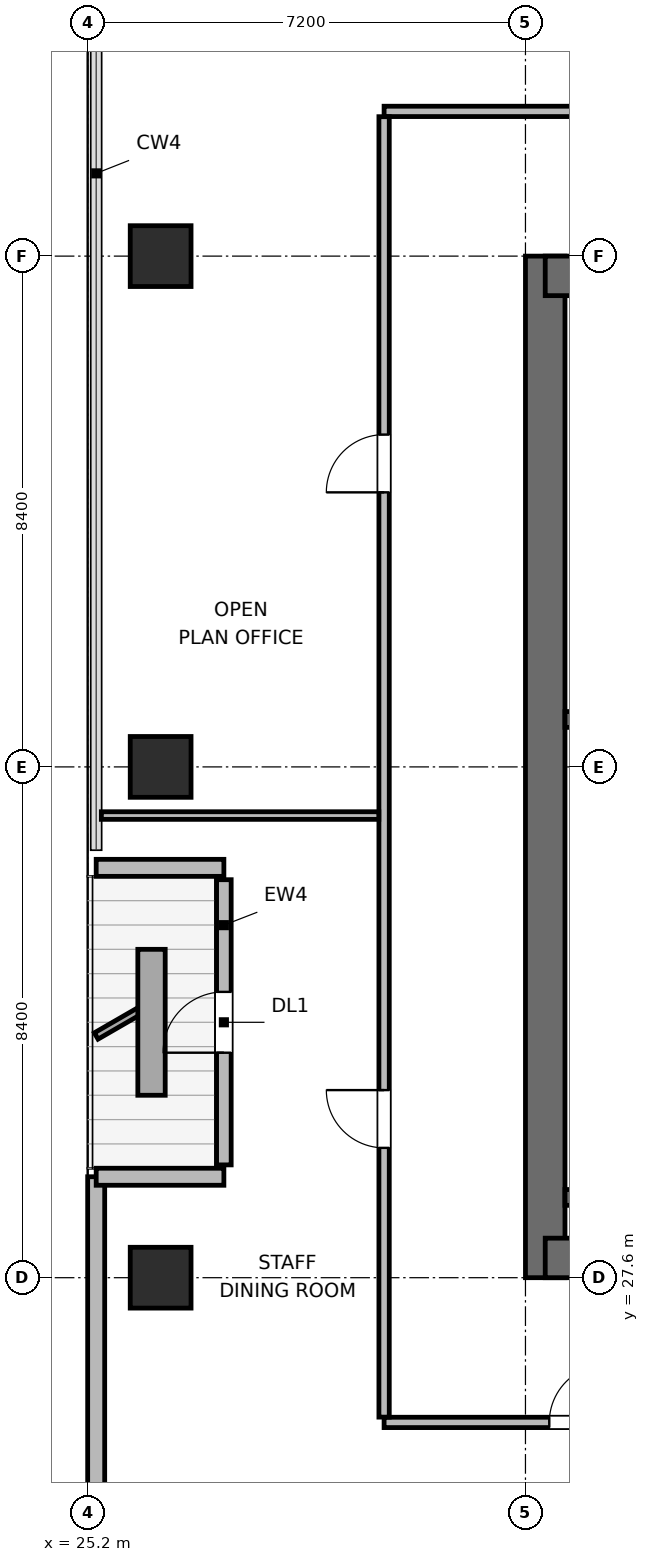
"""IFC4 building model, lengths in metres.
Left out: names, types, materials, properties, quantities, classifications, styles, units other than length and angle.
Written with IfcOpenShell. Run it as: python <this file> out.ifc"""

import sys

from ifc_helpers import new_model, si_unit, direction, frame, frame_2d, origin, origin_2d, place, context, subcontext, project, spatial, rectangle, extrude, element, fill, save


model = new_model("IFC4")
c1 = context("Model", 3, precision=1e-05, world=origin(), true_north=direction((0.0, 1.0)))
c2 = subcontext(c1, "Body", "Model", "MODEL_VIEW")
j1 = project(units=[si_unit("LENGTHUNIT", "METRE"), si_unit("PLANEANGLEUNIT", "RADIAN")], contexts=[c1])
p1 = place(None, origin())
s1 = spatial("IfcSite", under=j1, at=p1, CompositionType="ELEMENT")
p2 = place(p1, origin())
s2 = spatial("IfcBuilding", under=s1, at=p2, CompositionType="ELEMENT")
p3 = place(p2, frame((0.0, 0.0, 247.2)))
s3 = spatial("IfcBuildingStorey", under=s2, at=p3, CompositionType="ELEMENT", Elevation=247.2)
p4 = place(p3, frame((32.725, 27.6, 0.0), z_axis=(0.0, 0.0, 1.0), x_axis=(0.0, 1.0, 0.0)))
e1 = element("IfcWall", 1, at=p4, inside=s3, PredefinedType="SHEAR", context=c2, shape_type="SweptSolid", body=[
    extrude(rectangle(XDim=16.8, YDim=0.65, at=frame_2d((8.4, 0.0))), origin(), (0.0, 0.0, 1.0), 3.9),
])
p5 = place(p3, frame((32.725, 27.925, 0.0), z_axis=(0.0, 0.0, 1.0), x_axis=(1.0, 0.0, 0.0)))
e2 = element("IfcWall", 2, at=p5, inside=s3, PredefinedType="SHEAR", context=c2, shape_type="SweptSolid", body=[
    extrude(rectangle(XDim=9.35, YDim=0.65, at=frame_2d((4.675, 0.0))), origin(), (0.0, 0.0, 1.0), 3.9),
])
p6 = place(p5, frame((5.025, 0.0, 0.0)))
e3 = element("IfcOpeningElement", 3, at=p6, cuts=e2, PredefinedType="OPENING", context=c2, shape_type="SweptSolid", body=[
    extrude(rectangle(XDim=1.05, YDim=2.04, at=frame_2d((0.525, 1.02))), frame((0.0, 0.335, 0.0), z_axis=(0.0, -1.0, 0.0), x_axis=(1.0, 0.0, 0.0)), (0.0, 0.0, 1.0), 0.67),
])
p7 = place(p3, frame((32.725, 44.075, 0.0), z_axis=(0.0, 0.0, 1.0), x_axis=(1.0, 0.0, 0.0)))
e4 = element("IfcWall", 4, at=p7, inside=s3, PredefinedType="SHEAR", context=c2, shape_type="SweptSolid", body=[
    extrude(rectangle(XDim=9.35, YDim=0.65, at=frame_2d((4.675, 0.0))), origin(), (0.0, 0.0, 1.0), 3.9),
])
p8 = place(p7, frame((1.025, 0.0, 0.0)))
e5 = element("IfcOpeningElement", 5, at=p8, cuts=e4, PredefinedType="OPENING", context=c2, shape_type="SweptSolid", body=[
    extrude(rectangle(XDim=0.95, YDim=2.04, at=frame_2d((0.475, 1.02))), frame((0.0, 0.335, 0.0), z_axis=(0.0, -1.0, 0.0), x_axis=(1.0, 0.0, 0.0)), (0.0, 0.0, 1.0), 0.67),
])
p9 = place(p7, frame((4.275, 0.0, 0.0)))
e6 = element("IfcOpeningElement", 6, at=p9, cuts=e4, PredefinedType="OPENING", context=c2, shape_type="SweptSolid", body=[
    extrude(rectangle(XDim=0.9, YDim=2.02, at=frame_2d((0.45, 1.01))), frame((0.0, 0.335, 0.0), z_axis=(0.0, -1.0, 0.0), x_axis=(1.0, 0.0, 0.0)), (0.0, 0.0, 1.0), 0.67),
])
p10 = place(p7, frame((7.175, 0.0, 0.0)))
e7 = element("IfcOpeningElement", 7, at=p10, cuts=e4, PredefinedType="OPENING", context=c2, shape_type="SweptSolid", body=[
    extrude(rectangle(XDim=0.9, YDim=2.02, at=frame_2d((0.45, 1.01))), frame((0.0, 0.335, 0.0), z_axis=(0.0, -1.0, 0.0), x_axis=(1.0, 0.0, 0.0)), (0.0, 0.0, 1.0), 0.67),
])
for number, where, z_axis, x_axis in (
    (8, (33.05, 28.92, 0.0), (0.0, 0.0, 1.0), (1.0, 0.0, 0.0)),
    (9, (33.05, 36.78, 0.0), (0.0, 0.0, 1.0), (1.0, 0.0, 0.0)),
):
    element("IfcWall", number, at=place(p3, frame(where, z_axis=z_axis, x_axis=x_axis)), inside=s3, PredefinedType="SHEAR", context=c2, shape_type="SweptSolid", body=[
        extrude(rectangle(XDim=4.06, YDim=0.26, at=frame_2d((2.03, 0.0))), origin(), (0.0, 0.0, 1.0), 3.9),
    ])
for number, where, z_axis, x_axis in (
    (10, (26.4, 27.6, 0.0), (0.0, 0.0, 1.0), (1.0, 0.0, 0.0)),
    (11, (26.4, 36.0, 0.0), (0.0, 0.0, 1.0), (1.0, 0.0, 0.0)),
    (12, (26.4, 44.4, 0.0), (0.0, 0.0, 1.0), (1.0, 0.0, 0.0)),
):
    element("IfcColumn", number, at=place(p3, frame(where, z_axis=z_axis, x_axis=x_axis)), inside=s3, PredefinedType="COLUMN", context=c2, shape_type="SweptSolid", body=[
        extrude(rectangle(XDim=1.0, YDim=1.0, at=origin_2d()), origin(), (0.0, 0.0, 1.0), 3.9),
    ])
p11 = place(p3, frame((25.34, 23.818, 0.0), z_axis=(0.0, 0.0, 1.0), x_axis=(0.0, 1.0, 0.0)))
e13 = element("IfcWall", 13, at=p11, inside=s3, PredefinedType="SOLIDWALL", context=c2, shape_type="SweptSolid", body=[
    extrude(rectangle(XDim=5.442, YDim=0.28, at=frame_2d((2.721, 0.0))), origin(), (0.0, 0.0, 1.0), 3.68),
])
p12 = place(p3, frame((25.34, 29.26, 0.0), z_axis=(0.0, 0.0, 1.0), x_axis=(1.0, 0.0, 0.0)))
e14 = element("IfcWall", 14, at=p12, inside=s3, PredefinedType="SOLIDWALL", context=c2, shape_type="SweptSolid", body=[
    extrude(rectangle(XDim=2.1, YDim=0.28, at=frame_2d((1.05, 0.0))), origin(), (0.0, 0.0, 1.0), 3.116),
])
p13 = place(p3, frame((27.44, 29.455, 0.0), z_axis=(0.0, 0.0, 1.0), x_axis=(0.0, 1.0, 0.0)))
e15 = element("IfcWall", 15, at=p13, inside=s3, PredefinedType="SOLIDWALL", context=c2, shape_type="SweptSolid", body=[
    extrude(rectangle(XDim=4.69, YDim=0.24, at=frame_2d((2.345, 0.0))), origin(), (0.0, 0.0, 1.0), 3.248),
])
p14 = place(p13, frame((1.845, 0.0, 0.0)))
e16 = element("IfcOpeningElement", 16, at=p14, cuts=e15, PredefinedType="OPENING", context=c2, shape_type="SweptSolid", body=[
    extrude(rectangle(XDim=1.0, YDim=2.02, at=frame_2d((0.5, 1.01))), frame((0.0, 0.13, 0.0), z_axis=(0.0, -1.0, 0.0), x_axis=(1.0, 0.0, 0.0)), (0.0, 0.0, 1.0), 0.26),
])
p15 = place(p3, frame((27.44, 34.34, 0.0), z_axis=(0.0, 0.0, 1.0), x_axis=(-1.0, 0.0, 0.0)))
e17 = element("IfcWall", 17, at=p15, inside=s3, PredefinedType="SOLIDWALL", context=c2, shape_type="SweptSolid", body=[
    extrude(rectangle(XDim=2.1, YDim=0.28, at=frame_2d((1.05, 0.0))), origin(), (0.0, 0.0, 1.0), 3.116),
])
p16 = place(p3, frame((30.075, 25.22, 0.0), z_axis=(0.0, 0.0, 1.0), x_axis=(1.0, 0.0, 0.0)))
e18 = element("IfcWall", 18, at=p16, inside=s3, PredefinedType="PARTITIONING", context=c2, shape_type="SweptSolid", body=[
    extrude(rectangle(XDim=33.525, YDim=0.17, at=frame_2d((16.763, 0.0))), origin(), (0.0, 0.0, 1.0), 3.68),
])
p17 = place(p16, frame((2.717, 0.0, 0.0)))
e19 = element("IfcOpeningElement", 19, at=p17, cuts=e18, PredefinedType="OPENING", context=c2, shape_type="SweptSolid", body=[
    extrude(rectangle(XDim=0.95, YDim=2.04, at=frame_2d((0.475, 1.02))), frame((0.0, 0.095, 0.0), z_axis=(0.0, -1.0, 0.0), x_axis=(1.0, 0.0, 0.0)), (0.0, 0.0, 1.0), 0.19),
])
p18 = place(p16, frame((8.505, 0.0, 0.0)))
e20 = element("IfcOpeningElement", 20, at=p18, cuts=e18, PredefinedType="OPENING", context=c2, shape_type="SweptSolid", body=[
    extrude(rectangle(XDim=0.95, YDim=2.04, at=frame_2d((0.475, 1.02))), frame((0.0, 0.095, 0.0), z_axis=(0.0, -1.0, 0.0), x_axis=(1.0, 0.0, 0.0)), (0.0, 0.0, 1.0), 0.19),
])
p19 = place(p16, frame((13.695, 0.0, 0.0)))
e21 = element("IfcOpeningElement", 21, at=p19, cuts=e18, PredefinedType="OPENING", context=c2, shape_type="SweptSolid", body=[
    extrude(rectangle(XDim=0.95, YDim=2.04, at=frame_2d((0.475, 1.02))), frame((0.0, 0.095, 0.0), z_axis=(0.0, -1.0, 0.0), x_axis=(1.0, 0.0, 0.0)), (0.0, 0.0, 1.0), 0.19),
])
p20 = place(p16, frame((18.88, 0.0, 0.0)))
e22 = element("IfcOpeningElement", 22, at=p20, cuts=e18, PredefinedType="OPENING", context=c2, shape_type="SweptSolid", body=[
    extrude(rectangle(XDim=0.95, YDim=2.04, at=frame_2d((0.475, 1.02))), frame((0.0, 0.095, 0.0), z_axis=(0.0, -1.0, 0.0), x_axis=(1.0, 0.0, 0.0)), (0.0, 0.0, 1.0), 0.19),
])
p21 = place(p16, frame((24.065, 0.0, 0.0)))
e23 = element("IfcOpeningElement", 23, at=p21, cuts=e18, PredefinedType="OPENING", context=c2, shape_type="SweptSolid", body=[
    extrude(rectangle(XDim=0.95, YDim=2.04, at=frame_2d((0.475, 1.02))), frame((0.0, 0.095, 0.0), z_axis=(0.0, -1.0, 0.0), x_axis=(1.0, 0.0, 0.0)), (0.0, 0.0, 1.0), 0.19),
])
p22 = place(p16, frame((29.855, 0.0, 0.0)))
e24 = element("IfcOpeningElement", 24, at=p22, cuts=e18, PredefinedType="OPENING", context=c2, shape_type="SweptSolid", body=[
    extrude(rectangle(XDim=0.95, YDim=2.04, at=frame_2d((0.475, 1.02))), frame((0.0, 0.095, 0.0), z_axis=(0.0, -1.0, 0.0), x_axis=(1.0, 0.0, 0.0)), (0.0, 0.0, 1.0), 0.19),
])
p23 = place(p3, frame((30.075, 46.78, 0.0), z_axis=(0.0, 0.0, 1.0), x_axis=(1.0, 0.0, 0.0)))
e25 = element("IfcWall", 25, at=p23, inside=s3, PredefinedType="PARTITIONING", context=c2, shape_type="SweptSolid", body=[
    extrude(rectangle(XDim=33.525, YDim=0.17, at=frame_2d((16.763, 0.0))), origin(), (0.0, 0.0, 1.0), 3.68),
])
p24 = place(p23, frame((4.693, 0.0, 0.0)))
e26 = element("IfcOpeningElement", 26, at=p24, cuts=e25, PredefinedType="OPENING", context=c2, shape_type="SweptSolid", body=[
    extrude(rectangle(XDim=0.95, YDim=2.04, at=frame_2d((0.475, 1.02))), frame((0.0, 0.095, 0.0), z_axis=(0.0, -1.0, 0.0), x_axis=(1.0, 0.0, 0.0)), (0.0, 0.0, 1.0), 0.19),
])
p25 = place(p23, frame((11.725, 0.0, 0.0)))
e27 = element("IfcOpeningElement", 27, at=p25, cuts=e25, PredefinedType="OPENING", context=c2, shape_type="SweptSolid", body=[
    extrude(rectangle(XDim=0.95, YDim=2.04, at=frame_2d((0.475, 1.02))), frame((0.0, 0.095, 0.0), z_axis=(0.0, -1.0, 0.0), x_axis=(1.0, 0.0, 0.0)), (0.0, 0.0, 1.0), 0.19),
])
p26 = place(p23, frame((19.505, 0.0, 0.0)))
e28 = element("IfcOpeningElement", 28, at=p26, cuts=e25, PredefinedType="OPENING", context=c2, shape_type="SweptSolid", body=[
    extrude(rectangle(XDim=0.95, YDim=2.04, at=frame_2d((0.475, 1.02))), frame((0.0, 0.095, 0.0), z_axis=(0.0, -1.0, 0.0), x_axis=(1.0, 0.0, 0.0)), (0.0, 0.0, 1.0), 0.19),
])
p27 = place(p23, frame((29.235, 0.0, 0.0)))
e29 = element("IfcOpeningElement", 29, at=p27, cuts=e25, PredefinedType="OPENING", context=c2, shape_type="SweptSolid", body=[
    extrude(rectangle(XDim=0.95, YDim=2.04, at=frame_2d((0.475, 1.02))), frame((0.0, 0.095, 0.0), z_axis=(0.0, -1.0, 0.0), x_axis=(1.0, 0.0, 0.0)), (0.0, 0.0, 1.0), 0.19),
])
p28 = place(p3, frame((30.075, 25.307, 0.0), z_axis=(0.0, 0.0, 1.0), x_axis=(0.0, 1.0, 0.0)))
e30 = element("IfcWall", 30, at=p28, inside=s3, PredefinedType="PARTITIONING", context=c2, shape_type="SweptSolid", body=[
    extrude(rectangle(XDim=21.386, YDim=0.17, at=frame_2d((10.693, 0.0))), origin(), (0.0, 0.0, 1.0), 3.68),
])
p29 = place(p28, frame((4.428, 0.0, 0.0)))
e31 = element("IfcOpeningElement", 31, at=p29, cuts=e30, PredefinedType="OPENING", context=c2, shape_type="SweptSolid", body=[
    extrude(rectangle(XDim=0.95, YDim=2.04, at=frame_2d((0.475, 1.02))), frame((0.0, 0.095, 0.0), z_axis=(0.0, -1.0, 0.0), x_axis=(1.0, 0.0, 0.0)), (0.0, 0.0, 1.0), 0.19),
])
p30 = place(p28, frame((15.208, 0.0, 0.0)))
e32 = element("IfcOpeningElement", 32, at=p30, cuts=e30, PredefinedType="OPENING", context=c2, shape_type="SweptSolid", body=[
    extrude(rectangle(XDim=0.95, YDim=2.04, at=frame_2d((0.475, 1.02))), frame((0.0, 0.095, 0.0), z_axis=(0.0, -1.0, 0.0), x_axis=(1.0, 0.0, 0.0)), (0.0, 0.0, 1.0), 0.19),
])
p31 = place(p3, frame((25.425, 35.2, 0.0), z_axis=(0.0, 0.0, 1.0), x_axis=(1.0, 0.0, 0.0)))
e33 = element("IfcWall", 33, at=p31, inside=s3, PredefinedType="PARTITIONING", context=c2, shape_type="SweptSolid", body=[
    extrude(rectangle(XDim=4.563, YDim=0.125, at=frame_2d((2.281, 0.0))), origin(), (0.0, 0.0, 1.0), 3.68),
])
p32 = place(p14, origin())
e34 = element("IfcDoor", 34, at=p32, inside=s3, OperationType="SINGLE_SWING_LEFT", PredefinedType="DOOR", context=c2, shape_type="SweptSolid", body=[
    extrude(rectangle(XDim=1.0, YDim=2.02, at=frame_2d((0.5, 1.01))), frame((0.0, 0.025, 0.0), z_axis=(0.0, -1.0, 0.0), x_axis=(1.0, 0.0, 0.0)), (0.0, 0.0, 1.0), 0.05),
])
fill(e16, e34)
p33 = place(p17, origin())
e35 = element("IfcDoor", 35, at=p33, inside=s3, OperationType="SINGLE_SWING_RIGHT", PredefinedType="DOOR", context=c2, shape_type="SweptSolid", body=[
    extrude(rectangle(XDim=0.95, YDim=2.04, at=frame_2d((0.475, 1.02))), frame((0.0, 0.025, 0.0), z_axis=(0.0, -1.0, 0.0), x_axis=(1.0, 0.0, 0.0)), (0.0, 0.0, 1.0), 0.05),
])
fill(e19, e35)
p34 = place(p29, origin())
e36 = element("IfcDoor", 36, at=p34, inside=s3, OperationType="SINGLE_SWING_RIGHT", PredefinedType="DOOR", context=c2, shape_type="SweptSolid", body=[
    extrude(rectangle(XDim=0.95, YDim=2.04, at=frame_2d((0.475, 1.02))), frame((0.0, 0.025, 0.0), z_axis=(0.0, -1.0, 0.0), x_axis=(1.0, 0.0, 0.0)), (0.0, 0.0, 1.0), 0.05),
])
fill(e31, e36)
p35 = place(p30, origin())
e37 = element("IfcDoor", 37, at=p35, inside=s3, OperationType="SINGLE_SWING_LEFT", PredefinedType="DOOR", context=c2, shape_type="SweptSolid", body=[
    extrude(rectangle(XDim=0.95, YDim=2.04, at=frame_2d((0.475, 1.02))), frame((0.0, 0.025, 0.0), z_axis=(0.0, -1.0, 0.0), x_axis=(1.0, 0.0, 0.0)), (0.0, 0.0, 1.0), 0.05),
])
fill(e32, e37)
save(model, sys.argv[1])
